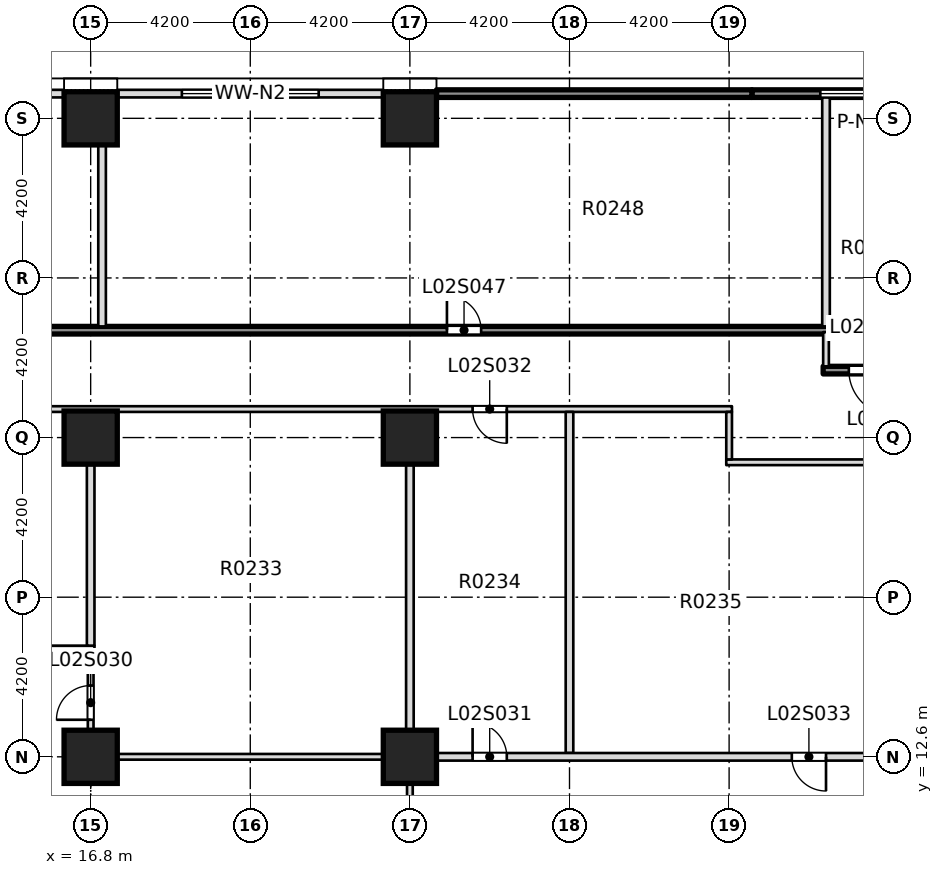
"""IFC4 building model, lengths in metres.
Left out: names, types, materials, properties, quantities, classifications, styles, units other than length and angle.
Written with IfcOpenShell. Run it as: python <this file> out.ifc"""

import sys

from ifc_helpers import new_model, si_unit, direction, frame, frame_2d, origin, origin_2d, place, context, subcontext, project, spatial, rectangle, extrude, element, fill, save


model = new_model("IFC4")
c1 = context("Model", 3, precision=1e-05, world=origin(), true_north=direction((0.0, 1.0)))
c2 = subcontext(c1, "Body", "Model", "MODEL_VIEW")
j1 = project(units=[si_unit("LENGTHUNIT", "METRE"), si_unit("PLANEANGLEUNIT", "RADIAN")], contexts=[c1])
p1 = place(None, origin())
s1 = spatial("IfcSite", under=j1, at=p1, CompositionType="ELEMENT")
p2 = place(p1, origin())
s2 = spatial("IfcBuilding", under=s1, at=p2, CompositionType="ELEMENT")
p3 = place(p2, frame((0.0, 0.0, 12.5)))
s3 = spatial("IfcBuildingStorey", under=s2, at=p3, CompositionType="ELEMENT", Elevation=12.5)
for number, where, z_axis, x_axis in (
    (1, (16.8, 12.6, -0.4), (0.0, 0.0, 1.0), (1.0, 0.0, 0.0)),
    (2, (25.2, 12.6, -0.4), (0.0, 0.0, 1.0), (1.0, 0.0, 0.0)),
    (3, (16.8, 21.0, -0.4), (0.0, 0.0, 1.0), (1.0, 0.0, 0.0)),
    (4, (25.2, 21.0, 0.0), (0.0, 0.0, 1.0), (1.0, 0.0, 0.0)),
    (5, (16.8, 29.4, 0.0), (0.0, 0.0, 1.0), (1.0, 0.0, 0.0)),
    (6, (25.2, 29.4, 0.0), (0.0, 0.0, 1.0), (1.0, 0.0, 0.0)),
):
    element("IfcColumn", number, at=place(p3, frame(where, z_axis=z_axis, x_axis=x_axis)), inside=s3, PredefinedType="COLUMN", context=c2, shape_type="SweptSolid", body=[
        extrude(rectangle(XDim=1.4, YDim=1.4, at=origin_2d()), origin(), (0.0, 0.0, 1.0), 7.5),
    ])
p4 = place(p3, frame((16.725, 12.6, 0.0), z_axis=(0.0, 0.0, 1.0), x_axis=(1.0, 0.0, 0.0)))
e7 = element("IfcWall", 7, at=p4, inside=s3, PredefinedType="PARTITIONING", context=c2, shape_type="SweptSolid", body=[
    extrude(rectangle(XDim=8.575, YDim=0.15, at=frame_2d((4.288, 0.0))), origin(), (0.0, 0.0, 1.0), 7.1),
])
p5 = place(p3, frame((25.1, 12.6, 0.0), z_axis=(0.0, 0.0, 1.0), x_axis=(1.0, 0.0, 0.0)))
e8 = element("IfcWall", 8, at=p5, inside=s3, PredefinedType="PARTITIONING", context=c2, shape_type="SweptSolid", body=[
    extrude(rectangle(XDim=0.8, YDim=0.2, at=frame_2d((0.4, 0.0))), origin(), (0.0, 0.0, 1.0), 7.1),
])
p6 = place(p3, frame((12.601, 15.45, 0.0), z_axis=(0.0, 0.0, 1.0), x_axis=(1.0, 0.0, 0.0)))
e9 = element("IfcWall", 9, at=p6, inside=s3, PredefinedType="PARTITIONING", context=c2, shape_type="SweptSolid", body=[
    extrude(rectangle(XDim=4.299, YDim=0.15, at=frame_2d((2.149, 0.0))), origin(), (0.0, 0.0, 1.0), 7.1),
])
p7 = place(p6, frame((1.549, 0.0, 0.0)))
e10 = element("IfcOpeningElement", 10, at=p7, cuts=e9, PredefinedType="OPENING", context=c2, shape_type="SweptSolid", body=[
    extrude(rectangle(XDim=1.1, YDim=2.1, at=frame_2d((0.55, 1.05))), frame((0.0, 0.085, 0.0), z_axis=(0.0, -1.0, 0.0), x_axis=(1.0, 0.0, 0.0)), (0.0, 0.0, 1.0), 0.17),
])
p8 = place(p3, frame((33.525, 20.35, 0.0), z_axis=(0.0, 0.0, 1.0), x_axis=(1.0, 0.0, 0.0)))
e11 = element("IfcWall", 11, at=p8, inside=s3, PredefinedType="PARTITIONING", context=c2, shape_type="SweptSolid", body=[
    extrude(rectangle(XDim=8.85, YDim=0.15, at=frame_2d((4.425, 0.0))), origin(), (0.0, 0.0, 1.0), 7.1),
])
p9 = place(p8, frame((3.825, 0.0, 0.0)))
e12 = element("IfcOpeningElement", 12, at=p9, cuts=e11, PredefinedType="OPENING", context=c2, shape_type="SweptSolid", body=[
    extrude(rectangle(XDim=0.9, YDim=2.1, at=frame_2d((0.45, 1.05))), frame((0.0, 0.085, 0.0), z_axis=(0.0, -1.0, 0.0), x_axis=(1.0, 0.0, 0.0)), (0.0, 0.0, 1.0), 0.17),
])
p10 = place(p3, frame((12.601, 21.75, 0.0), z_axis=(0.0, 0.0, 1.0), x_axis=(1.0, 0.0, 0.0)))
e13 = element("IfcWall", 13, at=p10, inside=s3, PredefinedType="PARTITIONING", context=c2, shape_type="SweptSolid", body=[
    extrude(rectangle(XDim=21.074, YDim=0.15, at=frame_2d((10.537, 0.0))), origin(), (0.0, 0.0, 1.0), 7.1),
])
p11 = place(p10, frame((14.249, 0.0, 0.0)))
e14 = element("IfcOpeningElement", 14, at=p11, cuts=e13, PredefinedType="OPENING", context=c2, shape_type="SweptSolid", body=[
    extrude(rectangle(XDim=0.9, YDim=2.1, at=frame_2d((0.45, 1.05))), frame((0.0, 0.085, 0.0), z_axis=(0.0, -1.0, 0.0), x_axis=(1.0, 0.0, 0.0)), (0.0, 0.0, 1.0), 0.17),
])
p12 = place(p3, frame((36.075, 22.775, 0.0), z_axis=(0.0, 0.0, 1.0), x_axis=(1.0, 0.0, 0.0)))
e15 = element("IfcWall", 15, at=p12, inside=s3, PredefinedType="SOLIDWALL", context=c2, shape_type="SweptSolid", body=[
    extrude(rectangle(XDim=6.3, YDim=0.2, at=frame_2d((3.15, 0.0))), origin(), (0.0, 0.0, 1.0), 7.1),
])
p13 = place(p12, frame((0.675, 0.0, 0.0)))
e16 = element("IfcOpeningElement", 16, at=p13, cuts=e15, PredefinedType="OPENING", context=c2, shape_type="SweptSolid", body=[
    extrude(rectangle(XDim=1.2, YDim=2.1, at=frame_2d((0.6, 1.05))), frame((0.0, 0.11, 0.0), z_axis=(0.0, -1.0, 0.0), x_axis=(1.0, 0.0, 0.0)), (0.0, 0.0, 1.0), 0.22),
])
p14 = place(p3, frame((-15.2, 23.825, 0.0), z_axis=(0.0, 0.0, 1.0), x_axis=(1.0, 0.0, 0.0)))
e17 = element("IfcWall", 17, at=p14, inside=s3, PredefinedType="SOLIDWALL", context=c2, shape_type="SweptSolid", body=[
    extrude(rectangle(XDim=51.45, YDim=0.2, at=frame_2d((25.725, 0.0))), origin(), (0.0, 0.0, 1.0), 7.1),
])
p15 = place(p14, frame((17.9, 0.0, 0.0)))
e18 = element("IfcOpeningElement", 18, at=p15, cuts=e17, PredefinedType="OPENING", context=c2, shape_type="SweptSolid", body=[
    extrude(rectangle(XDim=1.2, YDim=2.1, at=frame_2d((0.6, 1.05))), frame((0.0, 0.11, 0.0), z_axis=(0.0, -1.0, 0.0), x_axis=(1.0, 0.0, 0.0)), (0.0, 0.0, 1.0), 0.22),
])
p16 = place(p14, frame((1.7, 0.0, 0.0)))
e19 = element("IfcOpeningElement", 19, at=p16, cuts=e17, PredefinedType="OPENING", context=c2, shape_type="SweptSolid", body=[
    extrude(rectangle(XDim=0.9, YDim=2.1, at=frame_2d((0.45, 1.05))), frame((0.0, 0.11, 0.0), z_axis=(0.0, -1.0, 0.0), x_axis=(1.0, 0.0, 0.0)), (0.0, 0.0, 1.0), 0.22),
])
p17 = place(p14, frame((8.225, 0.0, 0.0)))
e20 = element("IfcOpeningElement", 20, at=p17, cuts=e17, PredefinedType="OPENING", context=c2, shape_type="SweptSolid", body=[
    extrude(rectangle(XDim=0.9, YDim=2.1, at=frame_2d((0.45, 1.05))), frame((0.0, 0.11, 0.0), z_axis=(0.0, -1.0, 0.0), x_axis=(1.0, 0.0, 0.0)), (0.0, 0.0, 1.0), 0.22),
])
p18 = place(p14, frame((25.4, 0.0, 0.0)))
e21 = element("IfcOpeningElement", 21, at=p18, cuts=e17, PredefinedType="OPENING", context=c2, shape_type="SweptSolid", body=[
    extrude(rectangle(XDim=1.2, YDim=2.1, at=frame_2d((0.6, 1.05))), frame((0.0, 0.11, 0.0), z_axis=(0.0, -1.0, 0.0), x_axis=(1.0, 0.0, 0.0)), (0.0, 0.0, 1.0), 0.22),
])
p19 = place(p14, frame((41.375, 0.0, 0.0)))
e22 = element("IfcOpeningElement", 22, at=p19, cuts=e17, PredefinedType="OPENING", context=c2, shape_type="SweptSolid", body=[
    extrude(rectangle(XDim=0.9, YDim=2.1, at=frame_2d((0.45, 1.05))), frame((0.0, 0.11, 0.0), z_axis=(0.0, -1.0, 0.0), x_axis=(1.0, 0.0, 0.0)), (0.0, 0.0, 1.0), 0.22),
])
p20 = place(p3, frame((16.8, 12.675, 0.0), z_axis=(0.0, 0.0, 1.0), x_axis=(0.0, 1.0, 0.0)))
e23 = element("IfcWall", 23, at=p20, inside=s3, PredefinedType="PARTITIONING", context=c2, shape_type="SweptSolid", body=[
    extrude(rectangle(XDim=2.7, YDim=0.15, at=frame_2d((1.35, 0.0))), origin(), (0.0, 0.0, 1.0), 7.1),
])
p21 = place(p20, frame((0.9, 0.0, 0.0)))
e24 = element("IfcOpeningElement", 24, at=p21, cuts=e23, PredefinedType="OPENING", context=c2, shape_type="SweptSolid", body=[
    extrude(rectangle(XDim=0.9, YDim=2.1, at=frame_2d((0.45, 1.05))), frame((0.0, 0.085, 0.0), z_axis=(0.0, -1.0, 0.0), x_axis=(1.0, 0.0, 0.0)), (0.0, 0.0, 1.0), 0.17),
])
p22 = place(p3, frame((16.8, 15.525, 0.0), z_axis=(0.0, 0.0, 1.0), x_axis=(0.0, 1.0, 0.0)))
e25 = element("IfcWall", 25, at=p22, inside=s3, PredefinedType="PARTITIONING", context=c2, shape_type="SweptSolid", body=[
    extrude(rectangle(XDim=6.15, YDim=0.2, at=frame_2d((3.075, 0.0))), origin(), (0.0, 0.0, 1.0), 7.1),
])
p23 = place(p3, frame((17.1, 23.925, 0.0), z_axis=(0.0, 0.0, 1.0), x_axis=(0.0, 1.0, 0.0)))
e26 = element("IfcWall", 26, at=p23, inside=s3, PredefinedType="PARTITIONING", context=c2, shape_type="SweptSolid", body=[
    extrude(rectangle(XDim=6.025, YDim=0.2, at=frame_2d((3.012, 0.0))), origin(), (0.0, 0.0, 1.0), 7.1),
])
p24 = place(p3, frame((25.2, -11.825, 0.0), z_axis=(0.0, 0.0, 1.0), x_axis=(0.0, 1.0, 0.0)))
e27 = element("IfcWall", 27, at=p24, inside=s3, PredefinedType="PARTITIONING", context=c2, shape_type="SweptSolid", body=[
    extrude(rectangle(XDim=24.325, YDim=0.15, at=frame_2d((12.163, 0.0))), origin(), (0.0, 0.0, 1.0), 7.1),
])
p25 = place(p24, frame((10.962, 0.0, 0.0)))
e28 = element("IfcOpeningElement", 28, at=p25, cuts=e27, PredefinedType="OPENING", context=c2, shape_type="SweptSolid", body=[
    extrude(rectangle(XDim=2.4, YDim=2.1, at=frame_2d((1.2, 1.05))), frame((0.0, 0.085, 0.0), z_axis=(0.0, -1.0, 0.0), x_axis=(1.0, 0.0, 0.0)), (0.0, 0.0, 1.0), 0.17),
])
for number, where, z_axis, x_axis in (
    (29, (25.2, 12.7, 0.0), (0.0, 0.0, 1.0), (0.0, 1.0, 0.0)),
    (30, (29.4, 12.7, 0.0), (0.0, 0.0, 1.0), (0.0, 1.0, 0.0)),
):
    element("IfcWall", number, at=place(p3, frame(where, z_axis=z_axis, x_axis=x_axis)), inside=s3, PredefinedType="PARTITIONING", context=c2, shape_type="SweptSolid", body=[
        extrude(rectangle(XDim=8.975, YDim=0.2, at=frame_2d((4.488, 0.0))), origin(), (0.0, 0.0, 1.0), 7.1),
    ])
p26 = place(p3, frame((33.6, 20.425, 0.0), z_axis=(0.0, 0.0, 1.0), x_axis=(0.0, 1.0, 0.0)))
e31 = element("IfcWall", 31, at=p26, inside=s3, PredefinedType="PARTITIONING", context=c2, shape_type="SweptSolid", body=[
    extrude(rectangle(XDim=1.25, YDim=0.15, at=frame_2d((0.625, 0.0))), origin(), (0.0, 0.0, 1.0), 7.1),
])
p27 = place(p3, frame((36.15, 22.875, 0.0), z_axis=(0.0, 0.0, 1.0), x_axis=(0.0, 1.0, 0.0)))
e32 = element("IfcWall", 32, at=p27, inside=s3, PredefinedType="PARTITIONING", context=c2, shape_type="SweptSolid", body=[
    extrude(rectangle(XDim=0.9, YDim=0.15, at=frame_2d((0.45, 0.0))), origin(), (0.0, 0.0, 1.0), 7.1),
])
p28 = place(p3, frame((36.15, 23.925, 0.0), z_axis=(0.0, 0.0, 1.0), x_axis=(0.0, 1.0, 0.0)))
e33 = element("IfcWall", 33, at=p28, inside=s3, PredefinedType="PARTITIONING", context=c2, shape_type="SweptSolid", body=[
    extrude(rectangle(XDim=6.025, YDim=0.2, at=frame_2d((3.012, 0.0))), origin(), (0.0, 0.0, 1.0), 7.1),
])
p29 = place(p3, frame((24.5, 30.05, 0.0), z_axis=(0.0, 0.0, 1.0), x_axis=(-1.0, 0.0, 0.0)))
e34 = element("IfcWall", 34, at=p29, inside=s3, PredefinedType="STANDARD", context=c2, shape_type="SweptSolid", body=[
    extrude(rectangle(XDim=7.0, YDim=0.2, at=frame_2d((3.5, 0.0))), origin(), (0.0, 0.0, 1.0), 7.1),
])
p30 = place(p29, frame((1.7, 0.0, 0.9)))
e35 = element("IfcOpeningElement", 35, at=p30, cuts=e34, PredefinedType="OPENING", context=c2, shape_type="SweptSolid", body=[
    extrude(rectangle(XDim=3.6, YDim=4.2, at=frame_2d((1.8, 2.1))), frame((0.0, 0.11, 0.0), z_axis=(0.0, -1.0, 0.0), x_axis=(1.0, 0.0, 0.0)), (0.0, 0.0, 1.0), 0.22),
])
p31 = place(p3, frame((16.1, 30.05, 0.0), z_axis=(0.0, 0.0, 1.0), x_axis=(-1.0, 0.0, 0.0)))
e36 = element("IfcWall", 36, at=p31, inside=s3, PredefinedType="STANDARD", context=c2, shape_type="SweptSolid", body=[
    extrude(rectangle(XDim=7.0, YDim=0.2, at=frame_2d((3.5, 0.0))), origin(), (0.0, 0.0, 1.0), 7.1),
])
p32 = place(p31, frame((1.7, 0.0, 0.9)))
e37 = element("IfcOpeningElement", 37, at=p32, cuts=e36, PredefinedType="OPENING", context=c2, shape_type="SweptSolid", body=[
    extrude(rectangle(XDim=3.6, YDim=4.2, at=frame_2d((1.8, 2.1))), frame((0.0, 0.11, 0.0), z_axis=(0.0, -1.0, 0.0), x_axis=(1.0, 0.0, 0.0)), (0.0, 0.0, 1.0), 0.22),
])
p33 = place(p3, frame((34.2, 30.05, 0.0), z_axis=(0.0, 0.0, 1.0), x_axis=(1.0, 0.0, 0.0)))
e38 = element("IfcWall", 38, at=p33, inside=s3, PredefinedType="SOLIDWALL", context=c2, shape_type="SweptSolid", body=[
    extrude(rectangle(XDim=7.2, YDim=0.2, at=frame_2d((3.6, 0.0))), origin(), (0.0, 0.0, 1.0), 7.1),
])
p34 = place(p33, frame((1.8, 0.0, 0.9)))
e39 = element("IfcOpeningElement", 39, at=p34, cuts=e38, PredefinedType="OPENING", context=c2, shape_type="SweptSolid", body=[
    extrude(rectangle(XDim=3.6, YDim=4.2, at=frame_2d((1.8, 2.1))), frame((0.0, 0.11, 0.0), z_axis=(0.0, -1.0, 0.0), x_axis=(1.0, 0.0, 0.0)), (0.0, 0.0, 1.0), 0.22),
])
p35 = place(p3, frame((25.9, 30.05, 0.0), z_axis=(0.0, 0.0, 1.0), x_axis=(1.0, 0.0, 0.0)))
e40 = element("IfcWall", 40, at=p35, inside=s3, PredefinedType="SOLIDWALL", context=c2, shape_type="SweptSolid", body=[
    extrude(rectangle(XDim=8.3, YDim=0.2, at=frame_2d((4.15, 0.0))), origin(), (0.0, 0.0, 1.0), 7.1),
])
p36 = place(p3, frame((25.9, 12.6, 0.0), z_axis=(0.0, 0.0, 1.0), x_axis=(1.0, 0.0, 0.0)))
e41 = element("IfcWall", 41, at=p36, inside=s3, PredefinedType="PARTITIONING", context=c2, shape_type="SweptSolid", body=[
    extrude(rectangle(XDim=23.8, YDim=0.2, at=frame_2d((11.9, 0.0))), origin(), (0.0, 0.0, 1.0), 4.4),
])
p37 = place(p36, frame((0.95, 0.0, 0.0)))
e42 = element("IfcOpeningElement", 42, at=p37, cuts=e41, PredefinedType="OPENING", context=c2, shape_type="SweptSolid", body=[
    extrude(rectangle(XDim=0.9, YDim=2.1, at=frame_2d((0.45, 1.05))), frame((0.0, 0.11, 0.0), z_axis=(0.0, -1.0, 0.0), x_axis=(1.0, 0.0, 0.0)), (0.0, 0.0, 1.0), 0.22),
])
p38 = place(p36, frame((9.35, 0.0, 0.0)))
e43 = element("IfcOpeningElement", 43, at=p38, cuts=e41, PredefinedType="OPENING", context=c2, shape_type="SweptSolid", body=[
    extrude(rectangle(XDim=0.9, YDim=2.1, at=frame_2d((0.45, 1.05))), frame((0.0, 0.11, 0.0), z_axis=(0.0, -1.0, 0.0), x_axis=(1.0, 0.0, 0.0)), (0.0, 0.0, 1.0), 0.22),
])
p39 = place(p13, origin())
e44 = element("IfcDoor", 44, at=p39, inside=s3, OperationType="SINGLE_SWING_LEFT", PredefinedType="DOOR", context=c2, shape_type="SweptSolid", body=[
    extrude(rectangle(XDim=1.2, YDim=2.1, at=frame_2d((0.6, 1.05))), frame((0.0, 0.025, 0.0), z_axis=(0.0, -1.0, 0.0), x_axis=(1.0, 0.0, 0.0)), (0.0, 0.0, 1.0), 0.05),
])
fill(e16, e44)
p40 = place(p21, origin())
e45 = element("IfcDoor", 45, at=p40, inside=s3, OperationType="SINGLE_SWING_RIGHT", PredefinedType="DOOR", context=c2, shape_type="SweptSolid", body=[
    extrude(rectangle(XDim=0.9, YDim=2.1, at=frame_2d((0.45, 1.05))), frame((0.0, 0.025, 0.0), z_axis=(0.0, -1.0, 0.0), x_axis=(1.0, 0.0, 0.0)), (0.0, 0.0, 1.0), 0.05),
])
fill(e24, e45)
p41 = place(p37, origin())
e46 = element("IfcDoor", 46, at=p41, inside=s3, OperationType="SINGLE_SWING_RIGHT", PredefinedType="DOOR", context=c2, shape_type="SweptSolid", body=[
    extrude(rectangle(XDim=0.9, YDim=2.1, at=frame_2d((0.45, 1.05))), frame((0.0, 0.025, 0.0), z_axis=(0.0, -1.0, 0.0), x_axis=(1.0, 0.0, 0.0)), (0.0, 0.0, 1.0), 0.05),
])
fill(e42, e46)
p42 = place(p11, origin())
e47 = element("IfcDoor", 47, at=p42, inside=s3, OperationType="SINGLE_SWING_LEFT", PredefinedType="DOOR", context=c2, shape_type="SweptSolid", body=[
    extrude(rectangle(XDim=0.9, YDim=2.1, at=frame_2d((0.45, 1.05))), frame((0.0, 0.025, 0.0), z_axis=(0.0, -1.0, 0.0), x_axis=(1.0, 0.0, 0.0)), (0.0, 0.0, 1.0), 0.05),
])
fill(e14, e47)
p43 = place(p38, origin())
e48 = element("IfcDoor", 48, at=p43, inside=s3, OperationType="SINGLE_SWING_LEFT", PredefinedType="DOOR", context=c2, shape_type="SweptSolid", body=[
    extrude(rectangle(XDim=0.9, YDim=2.1, at=frame_2d((0.45, 1.05))), frame((0.0, 0.025, 0.0), z_axis=(0.0, -1.0, 0.0), x_axis=(1.0, 0.0, 0.0)), (0.0, 0.0, 1.0), 0.05),
])
fill(e43, e48)
p44 = place(p19, origin())
e49 = element("IfcDoor", 49, at=p44, inside=s3, OperationType="SINGLE_SWING_RIGHT", PredefinedType="DOOR", context=c2, shape_type="SweptSolid", body=[
    extrude(rectangle(XDim=0.9, YDim=2.1, at=frame_2d((0.45, 1.05))), frame((0.0, 0.025, 0.0), z_axis=(0.0, -1.0, 0.0), x_axis=(1.0, 0.0, 0.0)), (0.0, 0.0, 1.0), 0.05),
])
fill(e22, e49)
p45 = place(p34, origin())
e50 = element("IfcWindow", 50, at=p45, inside=s3, PartitioningType="SINGLE_PANEL", PredefinedType="WINDOW", context=c2, shape_type="SweptSolid", body=[
    extrude(rectangle(XDim=3.6, YDim=4.2, at=frame_2d((1.8, 2.1))), frame((0.0, 0.03, 0.0), z_axis=(0.0, -1.0, 0.0), x_axis=(1.0, 0.0, 0.0)), (0.0, 0.0, 1.0), 0.06),
])
fill(e39, e50)
p46 = place(p30, origin())
e51 = element("IfcWindow", 51, at=p46, inside=s3, PartitioningType="SINGLE_PANEL", PredefinedType="WINDOW", context=c2, shape_type="SweptSolid", body=[
    extrude(rectangle(XDim=3.6, YDim=4.2, at=frame_2d((1.8, 2.1))), frame((0.0, 0.03, 0.0), z_axis=(0.0, -1.0, 0.0), x_axis=(1.0, 0.0, 0.0)), (0.0, 0.0, 1.0), 0.06),
])
fill(e35, e51)
save(model, sys.argv[1])
